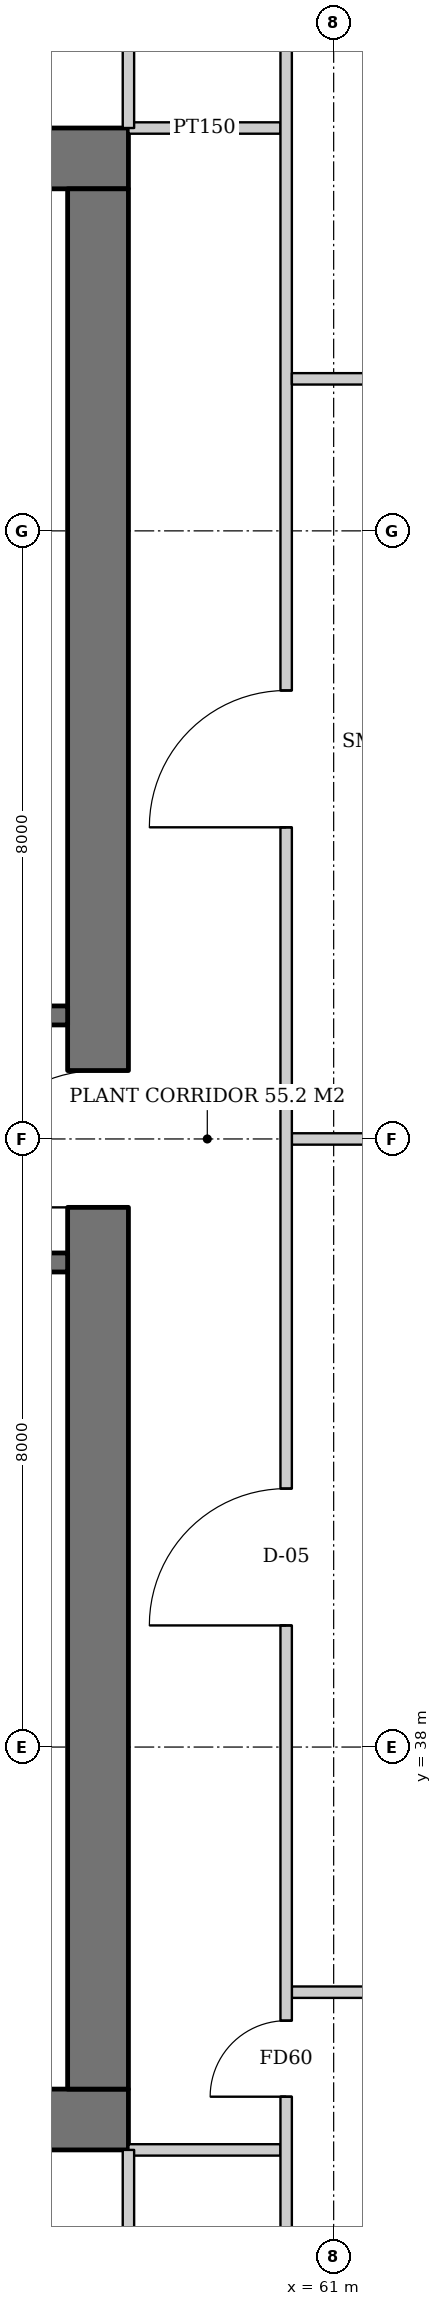
"""IFC4 building model, lengths in metres.
Left out: names, types, materials, properties, quantities, classifications, styles, units other than length and angle.
Written with IfcOpenShell. Run it as: python <this file> out.ifc"""

import sys

from ifc_helpers import new_model, si_unit, direction, frame, frame_2d, origin, place, context, subcontext, project, spatial, rectangle, extrude, element, fill, save


model = new_model("IFC4")
c1 = context("Model", 3, precision=1e-05, world=origin(), true_north=direction((0.0, 1.0)))
c2 = subcontext(c1, "Body", "Model", "MODEL_VIEW")
j1 = project(units=[si_unit("LENGTHUNIT", "METRE"), si_unit("PLANEANGLEUNIT", "RADIAN")], contexts=[c1])
p1 = place(None, origin())
s1 = spatial("IfcSite", under=j1, at=p1, CompositionType="ELEMENT")
p2 = place(p1, origin())
s2 = spatial("IfcBuilding", under=s1, at=p2, CompositionType="ELEMENT")
p3 = place(p2, frame((0.0, 0.0, 81.8)))
s3 = spatial("IfcBuildingStorey", under=s2, at=p3, CompositionType="ELEMENT", Elevation=81.8)
p4 = place(p3, frame((31.7, 33.1, 0.0), z_axis=(0.0, 0.0, 1.0), x_axis=(1.0, 0.0, 0.0)))
e1 = element("IfcWall", 1, at=p4, inside=s3, PredefinedType="SHEAR", context=c2, shape_type="SweptSolid", body=[
    extrude(rectangle(XDim=26.6, YDim=0.8, at=frame_2d((13.3, 0.0))), origin(), (0.0, 0.0, 1.0), 3.8),
])
p5 = place(p4, frame((7.3, 0.0, 0.0)))
e2 = element("IfcOpeningElement", 2, at=p5, cuts=e1, PredefinedType="OPENING", context=c2, shape_type="SweptSolid", body=[
    extrude(rectangle(XDim=1.0, YDim=2.1, at=frame_2d((0.5, 1.05))), frame((0.0, 0.41, 0.0), z_axis=(0.0, -1.0, 0.0), x_axis=(1.0, 0.0, 0.0)), (0.0, 0.0, 1.0), 0.82),
])
p6 = place(p4, frame((18.75, 0.0, 0.0)))
e3 = element("IfcOpeningElement", 3, at=p6, cuts=e1, PredefinedType="OPENING", context=c2, shape_type="SweptSolid", body=[
    extrude(rectangle(XDim=1.0, YDim=2.1, at=frame_2d((0.5, 1.05))), frame((0.0, 0.41, 0.0), z_axis=(0.0, -1.0, 0.0), x_axis=(1.0, 0.0, 0.0)), (0.0, 0.0, 1.0), 0.82),
])
p7 = place(p4, frame((3.25, 0.0, 0.0)))
e4 = element("IfcOpeningElement", 4, at=p7, cuts=e1, PredefinedType="OPENING", context=c2, shape_type="SweptSolid", body=[
    extrude(rectangle(XDim=1.0, YDim=2.1, at=frame_2d((0.5, 1.05))), frame((0.0, 0.41, 0.0), z_axis=(0.0, -1.0, 0.0), x_axis=(1.0, 0.0, 0.0)), (0.0, 0.0, 1.0), 0.82),
])
p8 = place(p3, frame((31.7, 58.9, 0.0), z_axis=(0.0, 0.0, 1.0), x_axis=(1.0, 0.0, 0.0)))
e5 = element("IfcWall", 5, at=p8, inside=s3, PredefinedType="SHEAR", context=c2, shape_type="SweptSolid", body=[
    extrude(rectangle(XDim=26.6, YDim=0.8, at=frame_2d((13.3, 0.0))), origin(), (0.0, 0.0, 1.0), 3.8),
])
p9 = place(p8, frame((17.94, 0.0, 0.0)))
e6 = element("IfcOpeningElement", 6, at=p9, cuts=e5, PredefinedType="OPENING", context=c2, shape_type="SweptSolid", body=[
    extrude(rectangle(XDim=1.0, YDim=2.1, at=frame_2d((0.5, 1.05))), frame((0.0, 0.41, 0.0), z_axis=(0.0, -1.0, 0.0), x_axis=(1.0, 0.0, 0.0)), (0.0, 0.0, 1.0), 0.82),
])
p10 = place(p8, frame((5.825, 0.0, 0.0)))
e7 = element("IfcOpeningElement", 7, at=p10, cuts=e5, PredefinedType="OPENING", context=c2, shape_type="SweptSolid", body=[
    extrude(rectangle(XDim=1.0, YDim=2.1, at=frame_2d((0.5, 1.05))), frame((0.0, 0.41, 0.0), z_axis=(0.0, -1.0, 0.0), x_axis=(1.0, 0.0, 0.0)), (0.0, 0.0, 1.0), 0.82),
])
p11 = place(p8, frame((1.233, 0.0, 0.0)))
e8 = element("IfcOpeningElement", 8, at=p11, cuts=e5, PredefinedType="OPENING", context=c2, shape_type="SweptSolid", body=[
    extrude(rectangle(XDim=1.0, YDim=2.1, at=frame_2d((0.5, 1.05))), frame((0.0, 0.41, 0.0), z_axis=(0.0, -1.0, 0.0), x_axis=(1.0, 0.0, 0.0)), (0.0, 0.0, 1.0), 0.82),
])
p12 = place(p8, frame((3.479, 0.0, 0.0)))
e9 = element("IfcOpeningElement", 9, at=p12, cuts=e5, PredefinedType="OPENING", context=c2, shape_type="SweptSolid", body=[
    extrude(rectangle(XDim=1.0, YDim=2.1, at=frame_2d((0.5, 1.05))), frame((0.0, 0.41, 0.0), z_axis=(0.0, -1.0, 0.0), x_axis=(1.0, 0.0, 0.0)), (0.0, 0.0, 1.0), 0.82),
])
p13 = place(p3, frame((57.9, 33.5, 0.0), z_axis=(0.0, 0.0, 1.0), x_axis=(0.0, 1.0, 0.0)))
e10 = element("IfcWall", 10, at=p13, inside=s3, PredefinedType="SHEAR", context=c2, shape_type="SweptSolid", body=[
    extrude(rectangle(XDim=25.0, YDim=0.8, at=frame_2d((12.5, 0.0))), origin(), (0.0, 0.0, 1.0), 3.8),
])
p14 = place(p13, frame((11.6, 0.0, 0.0)))
e11 = element("IfcOpeningElement", 11, at=p14, cuts=e10, PredefinedType="OPENING", context=c2, shape_type="SweptSolid", body=[
    extrude(rectangle(XDim=1.8, YDim=2.4, at=frame_2d((0.9, 1.2))), frame((0.0, 0.41, 0.0), z_axis=(0.0, -1.0, 0.0), x_axis=(1.0, 0.0, 0.0)), (0.0, 0.0, 1.0), 0.82),
])
p15 = place(p3, frame((54.9, 44.375, 0.0), z_axis=(0.0, 0.0, 1.0), x_axis=(1.0, 0.0, 0.0)))
e12 = element("IfcWall", 12, at=p15, inside=s3, PredefinedType="SOLIDWALL", context=c2, shape_type="SweptSolid", body=[
    extrude(rectangle(XDim=2.6, YDim=0.25, at=frame_2d((1.3, 0.0))), origin(), (0.0, 0.0, 1.0), 3.52),
])
p16 = place(p15, frame((0.8, 0.0, 0.0)))
e13 = element("IfcOpeningElement", 13, at=p16, cuts=e12, PredefinedType="OPENING", context=c2, shape_type="SweptSolid", body=[
    extrude(rectangle(XDim=1.0, YDim=2.1, at=frame_2d((0.5, 1.05))), frame((0.0, 0.135, 0.0), z_axis=(0.0, -1.0, 0.0), x_axis=(1.0, 0.0, 0.0)), (0.0, 0.0, 1.0), 0.27),
])
p17 = place(p3, frame((54.9, 47.625, 0.0), z_axis=(0.0, 0.0, 1.0), x_axis=(1.0, 0.0, 0.0)))
e14 = element("IfcWall", 14, at=p17, inside=s3, PredefinedType="SOLIDWALL", context=c2, shape_type="SweptSolid", body=[
    extrude(rectangle(XDim=2.6, YDim=0.25, at=frame_2d((1.3, 0.0))), origin(), (0.0, 0.0, 1.0), 3.52),
])
p18 = place(p17, frame((0.8, 0.0, 0.0)))
e15 = element("IfcOpeningElement", 15, at=p18, cuts=e14, PredefinedType="OPENING", context=c2, shape_type="SweptSolid", body=[
    extrude(rectangle(XDim=1.0, YDim=2.1, at=frame_2d((0.5, 1.05))), frame((0.0, 0.135, 0.0), z_axis=(0.0, -1.0, 0.0), x_axis=(1.0, 0.0, 0.0)), (0.0, 0.0, 1.0), 0.27),
])
p19 = place(p3, frame((58.3, 59.3, 0.0), z_axis=(0.0, 0.0, 1.0), x_axis=(1.0, 0.0, 0.0)))
e16 = element("IfcWall", 16, at=p19, inside=s3, PredefinedType="PARTITIONING", context=c2, shape_type="SweptSolid", body=[
    extrude(rectangle(XDim=2.0, YDim=0.15, at=frame_2d((1.0, 0.0))), origin(), (0.0, 0.0, 1.0), 3.52),
])
p20 = place(p3, frame((58.3, 32.7, 0.0), z_axis=(0.0, 0.0, 1.0), x_axis=(1.0, 0.0, 0.0)))
e17 = element("IfcWall", 17, at=p20, inside=s3, PredefinedType="PARTITIONING", context=c2, shape_type="SweptSolid", body=[
    extrude(rectangle(XDim=2.0, YDim=0.15, at=frame_2d((1.0, 0.0))), origin(), (0.0, 0.0, 1.0), 2.512),
])
p21 = place(p3, frame((60.45, 34.775, 0.0), z_axis=(0.0, 0.0, 1.0), x_axis=(1.0, 0.0, 0.0)))
e18 = element("IfcWall", 18, at=p21, inside=s3, PredefinedType="SOLIDWALL", context=c2, shape_type="SweptSolid", body=[
    extrude(rectangle(XDim=5.83, YDim=0.15, at=frame_2d((2.915, 0.0))), origin(), (0.0, 0.0, 1.0), 3.52),
])
p22 = place(p3, frame((60.45, 46.0, 0.0), z_axis=(0.0, 0.0, 1.0), x_axis=(1.0, 0.0, 0.0)))
e19 = element("IfcWall", 19, at=p22, inside=s3, PredefinedType="SOLIDWALL", context=c2, shape_type="SweptSolid", body=[
    extrude(rectangle(XDim=5.35, YDim=0.15, at=frame_2d((2.675, 0.0))), origin(), (0.0, 0.0, 1.0), 2.758),
])
p23 = place(p3, frame((60.375, 30.55, 0.0), z_axis=(0.0, 0.0, 1.0), x_axis=(0.0, 1.0, 0.0)))
e20 = element("IfcWall", 20, at=p23, inside=s3, PredefinedType="SOLIDWALL", context=c2, shape_type="SweptSolid", body=[
    extrude(rectangle(XDim=30.75, YDim=0.15, at=frame_2d((15.375, 0.0))), origin(), (0.0, 0.0, 1.0), 2.512),
])
p24 = place(p23, frame((2.85, 0.0, 0.0)))
e21 = element("IfcOpeningElement", 21, at=p24, cuts=e20, PredefinedType="OPENING", context=c2, shape_type="SweptSolid", body=[
    extrude(rectangle(XDim=1.0, YDim=2.1, at=frame_2d((0.5, 1.05))), frame((0.0, 0.085, 0.0), z_axis=(0.0, -1.0, 0.0), x_axis=(1.0, 0.0, 0.0)), (0.0, 0.0, 1.0), 0.17),
])
p25 = place(p23, frame((9.05, 0.0, 0.0)))
e22 = element("IfcOpeningElement", 22, at=p25, cuts=e20, PredefinedType="OPENING", context=c2, shape_type="SweptSolid", body=[
    extrude(rectangle(XDim=1.8, YDim=2.4, at=frame_2d((0.9, 1.2))), frame((0.0, 0.085, 0.0), z_axis=(0.0, -1.0, 0.0), x_axis=(1.0, 0.0, 0.0)), (0.0, 0.0, 1.0), 0.17),
])
p26 = place(p23, frame((19.55, 0.0, 0.0)))
e23 = element("IfcOpeningElement", 23, at=p26, cuts=e20, PredefinedType="OPENING", context=c2, shape_type="SweptSolid", body=[
    extrude(rectangle(XDim=1.8, YDim=2.4, at=frame_2d((0.9, 1.2))), frame((0.0, 0.085, 0.0), z_axis=(0.0, -1.0, 0.0), x_axis=(1.0, 0.0, 0.0)), (0.0, 0.0, 1.0), 0.17),
])
p27 = place(p3, frame((60.45, 56.0, 0.0), z_axis=(0.0, 0.0, 1.0), x_axis=(1.0, 0.0, 0.0)))
e24 = element("IfcWall", 24, at=p27, inside=s3, PredefinedType="SOLIDWALL", context=c2, shape_type="SweptSolid", body=[
    extrude(rectangle(XDim=5.35, YDim=0.15, at=frame_2d((2.675, 0.0))), origin(), (0.0, 0.0, 1.0), 3.52),
])
p28 = place(p3, frame((58.3, 59.3, 0.0), z_axis=(0.0, 0.0, 1.0), x_axis=(0.0, 1.0, 0.0)))
e25 = element("IfcWall", 25, at=p28, inside=s3, PredefinedType="PARTITIONING", context=c2, shape_type="SweptSolid", body=[
    extrude(rectangle(XDim=2.0, YDim=0.15, at=frame_2d((1.0, 0.0))), origin(), (0.0, 0.0, 1.0), 2.512),
])
p29 = place(p3, frame((58.3, 32.7, 0.0), z_axis=(0.0, 0.0, 1.0), x_axis=(0.0, -1.0, 0.0)))
e26 = element("IfcWall", 26, at=p29, inside=s3, PredefinedType="PARTITIONING", context=c2, shape_type="SweptSolid", body=[
    extrude(rectangle(XDim=2.0, YDim=0.15, at=frame_2d((1.0, 0.0))), origin(), (0.0, 0.0, 1.0), 3.52),
])
p30 = place(p14, origin())
e27 = element("IfcDoor", 27, at=p30, inside=s3, OperationType="DOUBLE_DOOR_SINGLE_SWING", PredefinedType="DOOR", context=c2, shape_type="SweptSolid", body=[
    extrude(rectangle(XDim=1.8, YDim=2.4, at=frame_2d((0.9, 1.2))), frame((0.0, 0.025, 0.0), z_axis=(0.0, -1.0, 0.0), x_axis=(1.0, 0.0, 0.0)), (0.0, 0.0, 1.0), 0.05),
])
fill(e11, e27)
p31 = place(p24, origin())
e28 = element("IfcDoor", 28, at=p31, inside=s3, OperationType="SINGLE_SWING_LEFT", PredefinedType="DOOR", context=c2, shape_type="SweptSolid", body=[
    extrude(rectangle(XDim=1.0, YDim=2.1, at=frame_2d((0.5, 1.05))), frame((0.0, 0.025, 0.0), z_axis=(0.0, -1.0, 0.0), x_axis=(1.0, 0.0, 0.0)), (0.0, 0.0, 1.0), 0.05),
])
fill(e21, e28)
p32 = place(p25, origin())
e29 = element("IfcDoor", 29, at=p32, inside=s3, OperationType="DOUBLE_DOOR_SINGLE_SWING", PredefinedType="DOOR", context=c2, shape_type="SweptSolid", body=[
    extrude(rectangle(XDim=1.8, YDim=2.4, at=frame_2d((0.9, 1.2))), frame((0.0, 0.025, 0.0), z_axis=(0.0, -1.0, 0.0), x_axis=(1.0, 0.0, 0.0)), (0.0, 0.0, 1.0), 0.05),
])
fill(e22, e29)
p33 = place(p26, origin())
e30 = element("IfcDoor", 30, at=p33, inside=s3, OperationType="DOUBLE_DOOR_SINGLE_SWING", PredefinedType="DOOR", context=c2, shape_type="SweptSolid", body=[
    extrude(rectangle(XDim=1.8, YDim=2.4, at=frame_2d((0.9, 1.2))), frame((0.0, 0.025, 0.0), z_axis=(0.0, -1.0, 0.0), x_axis=(1.0, 0.0, 0.0)), (0.0, 0.0, 1.0), 0.05),
])
fill(e23, e30)
save(model, sys.argv[1])
